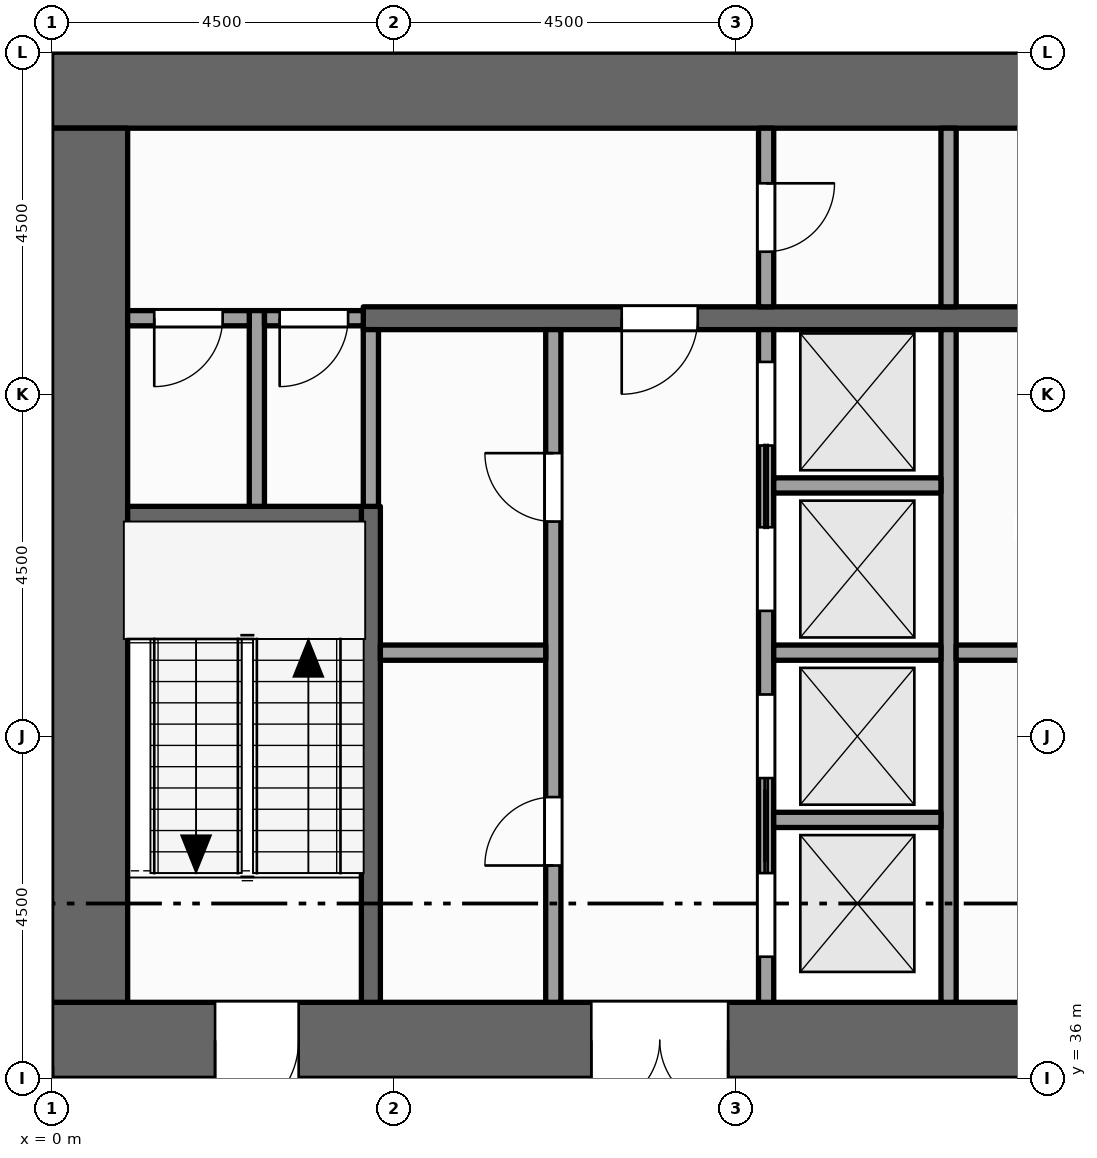
"""IFC4 building model, lengths in metres.
Left out: names, types, materials, properties, quantities, classifications, styles, units other than length and angle.
Written with IfcOpenShell. Run it as: python <this file> out.ifc"""

import sys

from ifc_helpers import new_model, si_unit, direction, frame, frame_2d, origin, place, context, subcontext, project, spatial, rectangle, extrude, element, fill, save


model = new_model("IFC4")
c1 = context("Model", 3, precision=1e-05, world=origin(), true_north=direction((0.0, 1.0)))
c2 = subcontext(c1, "Body", "Model", "MODEL_VIEW")
j1 = project(units=[si_unit("LENGTHUNIT", "METRE"), si_unit("PLANEANGLEUNIT", "RADIAN")], contexts=[c1])
p1 = place(None, origin())
s1 = spatial("IfcSite", under=j1, at=p1, CompositionType="ELEMENT")
p2 = place(p1, origin())
s2 = spatial("IfcBuilding", under=s1, at=p2, CompositionType="ELEMENT")
p3 = place(p2, frame((0.0, 0.0, 147.0)))
s3 = spatial("IfcBuildingStorey", under=s2, at=p3, CompositionType="ELEMENT", Elevation=147.0)
p4 = place(p3, frame((0.0, 36.5, -0.15), z_axis=(0.0, 0.0, 1.0), x_axis=(1.0, 0.0, 0.0)))
e1 = element("IfcWall", 1, at=p4, inside=s3, PredefinedType="SHEAR", context=c2, shape_type="SweptSolid", body=[
    extrude(rectangle(XDim=22.5, YDim=1.0, at=frame_2d((11.25, 0.0))), origin(), (0.0, 0.0, 1.0), 4.0),
])
p5 = place(p4, frame((7.1, 0.0, 0.15)))
e2 = element("IfcOpeningElement", 2, at=p5, cuts=e1, PredefinedType="OPENING", context=c2, shape_type="SweptSolid", body=[
    extrude(rectangle(XDim=1.8, YDim=2.1, at=frame_2d((0.9, 1.05))), frame((0.0, 0.51, 0.0), z_axis=(0.0, -1.0, 0.0), x_axis=(1.0, 0.0, 0.0)), (0.0, 0.0, 1.0), 1.02),
])
p6 = place(p4, frame((13.15, 0.0, 0.15)))
e3 = element("IfcOpeningElement", 3, at=p6, cuts=e1, PredefinedType="OPENING", context=c2, shape_type="SweptSolid", body=[
    extrude(rectangle(XDim=1.1, YDim=2.1, at=frame_2d((0.55, 1.05))), frame((0.0, 0.51, 0.0), z_axis=(0.0, -1.0, 0.0), x_axis=(1.0, 0.0, 0.0)), (0.0, 0.0, 1.0), 1.02),
])
p7 = place(p4, frame((2.15, 0.0, 0.15)))
e4 = element("IfcOpeningElement", 4, at=p7, cuts=e1, PredefinedType="OPENING", context=c2, shape_type="SweptSolid", body=[
    extrude(rectangle(XDim=1.1, YDim=2.1, at=frame_2d((0.55, 1.05))), frame((0.0, 0.51, 0.0), z_axis=(0.0, -1.0, 0.0), x_axis=(1.0, 0.0, 0.0)), (0.0, 0.0, 1.0), 1.02),
])
p8 = place(p4, frame((19.35, 0.0, 0.15)))
e5 = element("IfcOpeningElement", 5, at=p8, cuts=e1, PredefinedType="OPENING", context=c2, shape_type="SweptSolid", body=[
    extrude(rectangle(XDim=1.1, YDim=2.1, at=frame_2d((0.55, 1.05))), frame((0.0, 0.51, 0.0), z_axis=(0.0, -1.0, 0.0), x_axis=(1.0, 0.0, 0.0)), (0.0, 0.0, 1.0), 1.02),
])
p9 = place(p3, frame((0.0, 49.0, -0.15), z_axis=(0.0, 0.0, 1.0), x_axis=(1.0, 0.0, 0.0)))
e6 = element("IfcWall", 6, at=p9, inside=s3, PredefinedType="SHEAR", context=c2, shape_type="SweptSolid", body=[
    extrude(rectangle(XDim=22.5, YDim=1.0, at=frame_2d((11.25, 0.0))), origin(), (0.0, 0.0, 1.0), 4.0),
])
p10 = place(p3, frame((0.5, 37.0, -0.15), z_axis=(0.0, 0.0, 1.0), x_axis=(0.0, 1.0, 0.0)))
e7 = element("IfcWall", 7, at=p10, inside=s3, PredefinedType="SHEAR", context=c2, shape_type="SweptSolid", body=[
    extrude(rectangle(XDim=11.5, YDim=1.0, at=frame_2d((5.75, 0.0))), origin(), (0.0, 0.0, 1.0), 4.0),
])
p11 = place(p3, frame((0.0, 36.0, 0.0), z_axis=(0.0, 0.0, 1.0), x_axis=(-1.0, 0.0, 0.0)))
e8 = element("IfcWall", 8, at=p11, inside=s3, PredefinedType="STANDARD", context=c2, shape_type="SweptSolid", body=[
    extrude(rectangle(XDim=1.05, YDim=0.3, at=frame_2d((0.525, 0.0))), origin(), (0.0, 0.0, 1.0), 2.87),
])
p12 = place(p3, frame((2.7, 43.525, 0.0), z_axis=(0.0, 0.0, 1.0), x_axis=(0.0, 1.0, 0.0)))
e9 = element("IfcWall", 9, at=p12, inside=s3, PredefinedType="PARTITIONING", context=c2, shape_type="SweptSolid", body=[
    extrude(rectangle(XDim=2.575, YDim=0.2, at=frame_2d((1.288, 0.0))), origin(), (0.0, 0.0, 1.0), 3.85),
])
p13 = place(p3, frame((4.2, 37.0, 0.0), z_axis=(0.0, 0.0, 1.0), x_axis=(0.0, 1.0, 0.0)))
e10 = element("IfcWall", 10, at=p13, inside=s3, PredefinedType="SHEAR", context=c2, shape_type="SweptSolid", body=[
    extrude(rectangle(XDim=6.525, YDim=0.25, at=frame_2d((3.262, 0.0))), origin(), (0.0, 0.0, 1.0), 3.85),
])
p14 = place(p3, frame((4.2, 43.525, 0.0), z_axis=(0.0, 0.0, 1.0), x_axis=(0.0, 1.0, 0.0)))
e11 = element("IfcWall", 11, at=p14, inside=s3, PredefinedType="PARTITIONING", context=c2, shape_type="SweptSolid", body=[
    extrude(rectangle(XDim=2.325, YDim=0.2, at=frame_2d((1.163, 0.0))), origin(), (0.0, 0.0, 1.0), 3.85),
])
p15 = place(p3, frame((6.6, 37.0, 0.0), z_axis=(0.0, 0.0, 1.0), x_axis=(0.0, 1.0, 0.0)))
e12 = element("IfcWall", 12, at=p15, inside=s3, PredefinedType="PARTITIONING", context=c2, shape_type="SweptSolid", body=[
    extrude(rectangle(XDim=8.85, YDim=0.2, at=frame_2d((4.425, 0.0))), origin(), (0.0, 0.0, 1.0), 3.85),
])
p16 = place(p15, frame((1.8, 0.0, 0.0)))
e13 = element("IfcOpeningElement", 13, at=p16, cuts=e12, PredefinedType="OPENING", context=c2, shape_type="SweptSolid", body=[
    extrude(rectangle(XDim=0.9, YDim=2.1, at=frame_2d((0.45, 1.05))), frame((0.0, 0.11, 0.0), z_axis=(0.0, -1.0, 0.0), x_axis=(1.0, 0.0, 0.0)), (0.0, 0.0, 1.0), 0.22),
])
p17 = place(p15, frame((6.325, 0.0, 0.0)))
e14 = element("IfcOpeningElement", 14, at=p17, cuts=e12, PredefinedType="OPENING", context=c2, shape_type="SweptSolid", body=[
    extrude(rectangle(XDim=0.9, YDim=2.1, at=frame_2d((0.45, 1.05))), frame((0.0, 0.11, 0.0), z_axis=(0.0, -1.0, 0.0), x_axis=(1.0, 0.0, 0.0)), (0.0, 0.0, 1.0), 0.22),
])
p18 = place(p3, frame((9.4, 37.0, 0.0), z_axis=(0.0, 0.0, 1.0), x_axis=(0.0, 1.0, 0.0)))
e15 = element("IfcWall", 15, at=p18, inside=s3, PredefinedType="SOLIDWALL", context=c2, shape_type="SweptSolid", body=[
    extrude(rectangle(XDim=8.85, YDim=0.2, at=frame_2d((4.425, 0.0))), origin(), (0.0, 0.0, 1.0), 3.85),
])
p19 = place(p18, frame((0.6, 0.0, 0.012)))
e16 = element("IfcOpeningElement", 16, at=p19, cuts=e15, PredefinedType="OPENING", context=c2, shape_type="SweptSolid", body=[
    extrude(rectangle(XDim=1.1, YDim=2.1, at=frame_2d((0.55, 1.05))), frame((0.0, 0.11, 0.0), z_axis=(0.0, -1.0, 0.0), x_axis=(1.0, 0.0, 0.0)), (0.0, 0.0, 1.0), 0.22),
])
p20 = place(p18, frame((2.95, 0.0, 0.012)))
e17 = element("IfcOpeningElement", 17, at=p20, cuts=e15, PredefinedType="OPENING", context=c2, shape_type="SweptSolid", body=[
    extrude(rectangle(XDim=1.1, YDim=2.1, at=frame_2d((0.55, 1.05))), frame((0.0, 0.11, 0.0), z_axis=(0.0, -1.0, 0.0), x_axis=(1.0, 0.0, 0.0)), (0.0, 0.0, 1.0), 0.22),
])
p21 = place(p18, frame((5.15, 0.0, 0.012)))
e18 = element("IfcOpeningElement", 18, at=p21, cuts=e15, PredefinedType="OPENING", context=c2, shape_type="SweptSolid", body=[
    extrude(rectangle(XDim=1.1, YDim=2.1, at=frame_2d((0.55, 1.05))), frame((0.0, 0.11, 0.0), z_axis=(0.0, -1.0, 0.0), x_axis=(1.0, 0.0, 0.0)), (0.0, 0.0, 1.0), 0.22),
])
p22 = place(p18, frame((7.325, 0.0, 0.012)))
e19 = element("IfcOpeningElement", 19, at=p22, cuts=e15, PredefinedType="OPENING", context=c2, shape_type="SweptSolid", body=[
    extrude(rectangle(XDim=1.1, YDim=2.1, at=frame_2d((0.55, 1.05))), frame((0.0, 0.11, 0.0), z_axis=(0.0, -1.0, 0.0), x_axis=(1.0, 0.0, 0.0)), (0.0, 0.0, 1.0), 0.22),
])
p23 = place(p3, frame((9.4, 46.15, 0.0), z_axis=(0.0, 0.0, 1.0), x_axis=(0.0, 1.0, 0.0)))
e20 = element("IfcWall", 20, at=p23, inside=s3, PredefinedType="PARTITIONING", context=c2, shape_type="SweptSolid", body=[
    extrude(rectangle(XDim=2.35, YDim=0.2, at=frame_2d((1.175, 0.0))), origin(), (0.0, 0.0, 1.0), 3.85),
])
p24 = place(p23, frame((0.725, 0.0, 0.0)))
e21 = element("IfcOpeningElement", 21, at=p24, cuts=e20, PredefinedType="OPENING", context=c2, shape_type="SweptSolid", body=[
    extrude(rectangle(XDim=0.9, YDim=2.1, at=frame_2d((0.45, 1.05))), frame((0.0, 0.11, 0.0), z_axis=(0.0, -1.0, 0.0), x_axis=(1.0, 0.0, 0.0)), (0.0, 0.0, 1.0), 0.22),
])
p25 = place(p3, frame((11.8, 37.0, 0.0), z_axis=(0.0, 0.0, 1.0), x_axis=(0.0, 1.0, 0.0)))
e22 = element("IfcWall", 22, at=p25, inside=s3, PredefinedType="SOLIDWALL", context=c2, shape_type="SweptSolid", body=[
    extrude(rectangle(XDim=8.85, YDim=0.2, at=frame_2d((4.425, 0.0))), origin(), (0.0, 0.0, 1.0), 3.85),
])
p26 = place(p3, frame((11.8, 46.15, 0.0), z_axis=(0.0, 0.0, 1.0), x_axis=(0.0, 1.0, 0.0)))
e23 = element("IfcWall", 23, at=p26, inside=s3, PredefinedType="PARTITIONING", context=c2, shape_type="SweptSolid", body=[
    extrude(rectangle(XDim=2.35, YDim=0.2, at=frame_2d((1.175, 0.0))), origin(), (0.0, 0.0, 1.0), 3.85),
])
p27 = place(p3, frame((9.5, 39.4, 0.0), z_axis=(0.0, 0.0, 1.0), x_axis=(1.0, 0.0, 0.0)))
e24 = element("IfcWall", 24, at=p27, inside=s3, PredefinedType="SOLIDWALL", context=c2, shape_type="SweptSolid", body=[
    extrude(rectangle(XDim=2.2, YDim=0.2, at=frame_2d((1.1, 0.0))), origin(), (0.0, 0.0, 1.0), 3.85),
])
p28 = place(p3, frame((4.325, 41.6, 0.0), z_axis=(0.0, 0.0, 1.0), x_axis=(1.0, 0.0, 0.0)))
e25 = element("IfcWall", 25, at=p28, inside=s3, PredefinedType="PARTITIONING", context=c2, shape_type="SweptSolid", body=[
    extrude(rectangle(XDim=2.175, YDim=0.2, at=frame_2d((1.087, 0.0))), origin(), (0.0, 0.0, 1.0), 3.85),
])
p29 = place(p3, frame((9.5, 41.6, 0.0), z_axis=(0.0, 0.0, 1.0), x_axis=(1.0, 0.0, 0.0)))
e26 = element("IfcWall", 26, at=p29, inside=s3, PredefinedType="SOLIDWALL", context=c2, shape_type="SweptSolid", body=[
    extrude(rectangle(XDim=2.2, YDim=0.2, at=frame_2d((1.1, 0.0))), origin(), (0.0, 0.0, 1.0), 3.85),
])
p30 = place(p3, frame((11.9, 41.6, 0.0), z_axis=(0.0, 0.0, 1.0), x_axis=(1.0, 0.0, 0.0)))
e27 = element("IfcWall", 27, at=p30, inside=s3, PredefinedType="PARTITIONING", context=c2, shape_type="SweptSolid", body=[
    extrude(rectangle(XDim=3.6, YDim=0.2, at=frame_2d((1.8, 0.0))), origin(), (0.0, 0.0, 1.0), 3.85),
])
p31 = place(p30, frame((1.3, 0.0, 0.0)))
e28 = element("IfcOpeningElement", 28, at=p31, cuts=e27, PredefinedType="OPENING", context=c2, shape_type="SweptSolid", body=[
    extrude(rectangle(XDim=1.0, YDim=2.1, at=frame_2d((0.5, 1.05))), frame((0.0, 0.11, 0.0), z_axis=(0.0, -1.0, 0.0), x_axis=(1.0, 0.0, 0.0)), (0.0, 0.0, 1.0), 0.22),
])
p32 = place(p3, frame((1.0, 43.4, 0.0), z_axis=(0.0, 0.0, 1.0), x_axis=(1.0, 0.0, 0.0)))
e29 = element("IfcWall", 29, at=p32, inside=s3, PredefinedType="SHEAR", context=c2, shape_type="SweptSolid", body=[
    extrude(rectangle(XDim=3.075, YDim=0.25, at=frame_2d((1.538, 0.0))), origin(), (0.0, 0.0, 1.0), 3.85),
])
p33 = place(p3, frame((9.5, 43.8, 0.0), z_axis=(0.0, 0.0, 1.0), x_axis=(1.0, 0.0, 0.0)))
e30 = element("IfcWall", 30, at=p33, inside=s3, PredefinedType="SOLIDWALL", context=c2, shape_type="SweptSolid", body=[
    extrude(rectangle(XDim=2.2, YDim=0.2, at=frame_2d((1.1, 0.0))), origin(), (0.0, 0.0, 1.0), 3.85),
])
p34 = place(p3, frame((1.0, 46.0, 0.0), z_axis=(0.0, 0.0, 1.0), x_axis=(1.0, 0.0, 0.0)))
e31 = element("IfcWall", 31, at=p34, inside=s3, PredefinedType="PARTITIONING", context=c2, shape_type="SweptSolid", body=[
    extrude(rectangle(XDim=1.6, YDim=0.2, at=frame_2d((0.8, 0.0))), origin(), (0.0, 0.0, 1.0), 3.85),
])
p35 = place(p34, frame((0.35, 0.0, 0.0)))
e32 = element("IfcOpeningElement", 32, at=p35, cuts=e31, PredefinedType="OPENING", context=c2, shape_type="SweptSolid", body=[
    extrude(rectangle(XDim=0.9, YDim=2.1, at=frame_2d((0.45, 1.05))), frame((0.0, 0.11, 0.0), z_axis=(0.0, -1.0, 0.0), x_axis=(1.0, 0.0, 0.0)), (0.0, 0.0, 1.0), 0.22),
])
p36 = place(p3, frame((2.8, 46.0, 0.0), z_axis=(0.0, 0.0, 1.0), x_axis=(1.0, 0.0, 0.0)))
e33 = element("IfcWall", 33, at=p36, inside=s3, PredefinedType="PARTITIONING", context=c2, shape_type="SweptSolid", body=[
    extrude(rectangle(XDim=1.3, YDim=0.2, at=frame_2d((0.65, 0.0))), origin(), (0.0, 0.0, 1.0), 3.85),
])
p37 = place(p36, frame((0.2, 0.0, 0.0)))
e34 = element("IfcOpeningElement", 34, at=p37, cuts=e33, PredefinedType="OPENING", context=c2, shape_type="SweptSolid", body=[
    extrude(rectangle(XDim=0.9, YDim=2.1, at=frame_2d((0.45, 1.05))), frame((0.0, 0.11, 0.0), z_axis=(0.0, -1.0, 0.0), x_axis=(1.0, 0.0, 0.0)), (0.0, 0.0, 1.0), 0.22),
])
p38 = place(p3, frame((4.1, 46.0, 0.0), z_axis=(0.0, 0.0, 1.0), x_axis=(1.0, 0.0, 0.0)))
e35 = element("IfcWall", 35, at=p38, inside=s3, PredefinedType="SHEAR", context=c2, shape_type="SweptSolid", body=[
    extrude(rectangle(XDim=14.5, YDim=0.3, at=frame_2d((7.25, 0.0))), origin(), (0.0, 0.0, 1.0), 3.85),
])
p39 = place(p38, frame((3.4, 0.0, 0.0)))
e36 = element("IfcOpeningElement", 36, at=p39, cuts=e35, PredefinedType="OPENING", context=c2, shape_type="SweptSolid", body=[
    extrude(rectangle(XDim=1.0, YDim=2.1, at=frame_2d((0.5, 1.05))), frame((0.0, 0.16, 0.0), z_axis=(0.0, -1.0, 0.0), x_axis=(1.0, 0.0, 0.0)), (0.0, 0.0, 1.0), 0.32),
])
p40 = place(p38, frame((9.1, 0.0, 0.0)))
e37 = element("IfcOpeningElement", 37, at=p40, cuts=e35, PredefinedType="OPENING", context=c2, shape_type="SweptSolid", body=[
    extrude(rectangle(XDim=1.0, YDim=2.1, at=frame_2d((0.5, 1.05))), frame((0.0, 0.16, 0.0), z_axis=(0.0, -1.0, 0.0), x_axis=(1.0, 0.0, 0.0)), (0.0, 0.0, 1.0), 0.32),
])
p41 = place(p19, origin())
e38 = element("IfcDoor", 38, at=p41, inside=s3, OperationType="SLIDING_TO_RIGHT", PredefinedType="DOOR", context=c2, shape_type="SweptSolid", body=[
    extrude(rectangle(XDim=1.1, YDim=2.1, at=frame_2d((0.55, 1.05))), frame((0.0, 0.025, 0.0), z_axis=(0.0, -1.0, 0.0), x_axis=(1.0, 0.0, 0.0)), (0.0, 0.0, 1.0), 0.05),
])
fill(e16, e38)
p42 = place(p20, origin())
e39 = element("IfcDoor", 39, at=p42, inside=s3, OperationType="SLIDING_TO_LEFT", PredefinedType="DOOR", context=c2, shape_type="SweptSolid", body=[
    extrude(rectangle(XDim=1.1, YDim=2.1, at=frame_2d((0.55, 1.05))), frame((0.0, 0.025, 0.0), z_axis=(0.0, -1.0, 0.0), x_axis=(1.0, 0.0, 0.0)), (0.0, 0.0, 1.0), 0.05),
])
fill(e17, e39)
p43 = place(p21, origin())
e40 = element("IfcDoor", 40, at=p43, inside=s3, OperationType="SLIDING_TO_RIGHT", PredefinedType="DOOR", context=c2, shape_type="SweptSolid", body=[
    extrude(rectangle(XDim=1.1, YDim=2.1, at=frame_2d((0.55, 1.05))), frame((0.0, 0.025, 0.0), z_axis=(0.0, -1.0, 0.0), x_axis=(1.0, 0.0, 0.0)), (0.0, 0.0, 1.0), 0.05),
])
fill(e18, e40)
p44 = place(p22, origin())
e41 = element("IfcDoor", 41, at=p44, inside=s3, OperationType="SLIDING_TO_LEFT", PredefinedType="DOOR", context=c2, shape_type="SweptSolid", body=[
    extrude(rectangle(XDim=1.1, YDim=2.1, at=frame_2d((0.55, 1.05))), frame((0.0, 0.025, 0.0), z_axis=(0.0, -1.0, 0.0), x_axis=(1.0, 0.0, 0.0)), (0.0, 0.0, 1.0), 0.05),
])
fill(e19, e41)
p45 = place(p5, origin())
e42 = element("IfcDoor", 42, at=p45, inside=s3, OperationType="DOUBLE_DOOR_SINGLE_SWING", PredefinedType="DOOR", context=c2, shape_type="SweptSolid", body=[
    extrude(rectangle(XDim=1.8, YDim=2.1, at=frame_2d((0.9, 1.05))), frame((0.0, 0.025, 0.0), z_axis=(0.0, -1.0, 0.0), x_axis=(1.0, 0.0, 0.0)), (0.0, 0.0, 1.0), 0.05),
])
fill(e2, e42)
p46 = place(p39, origin())
e43 = element("IfcDoor", 43, at=p46, inside=s3, OperationType="SINGLE_SWING_LEFT", PredefinedType="DOOR", context=c2, shape_type="SweptSolid", body=[
    extrude(rectangle(XDim=1.0, YDim=2.1, at=frame_2d((0.5, 1.05))), frame((0.0, 0.025, 0.0), z_axis=(0.0, -1.0, 0.0), x_axis=(1.0, 0.0, 0.0)), (0.0, 0.0, 1.0), 0.05),
])
fill(e36, e43)
p47 = place(p24, origin())
e44 = element("IfcDoor", 44, at=p47, inside=s3, OperationType="SINGLE_SWING_RIGHT", PredefinedType="DOOR", context=c2, shape_type="SweptSolid", body=[
    extrude(rectangle(XDim=0.9, YDim=2.1, at=frame_2d((0.45, 1.05))), frame((0.0, 0.025, 0.0), z_axis=(0.0, -1.0, 0.0), x_axis=(1.0, 0.0, 0.0)), (0.0, 0.0, 1.0), 0.05),
])
fill(e21, e44)
p48 = place(p7, origin())
e45 = element("IfcDoor", 45, at=p48, inside=s3, OperationType="SINGLE_SWING_LEFT", PredefinedType="DOOR", context=c2, shape_type="SweptSolid", body=[
    extrude(rectangle(XDim=1.1, YDim=2.1, at=frame_2d((0.55, 1.05))), frame((0.0, 0.025, 0.0), z_axis=(0.0, -1.0, 0.0), x_axis=(1.0, 0.0, 0.0)), (0.0, 0.0, 1.0), 0.05),
])
fill(e4, e45)
p49 = place(p35, origin())
e46 = element("IfcDoor", 46, at=p49, inside=s3, OperationType="SINGLE_SWING_LEFT", PredefinedType="DOOR", context=c2, shape_type="SweptSolid", body=[
    extrude(rectangle(XDim=0.9, YDim=2.1, at=frame_2d((0.45, 1.05))), frame((0.0, 0.025, 0.0), z_axis=(0.0, -1.0, 0.0), x_axis=(1.0, 0.0, 0.0)), (0.0, 0.0, 1.0), 0.05),
])
fill(e32, e46)
p50 = place(p37, origin())
e47 = element("IfcDoor", 47, at=p50, inside=s3, OperationType="SINGLE_SWING_LEFT", PredefinedType="DOOR", context=c2, shape_type="SweptSolid", body=[
    extrude(rectangle(XDim=0.9, YDim=2.1, at=frame_2d((0.45, 1.05))), frame((0.0, 0.025, 0.0), z_axis=(0.0, -1.0, 0.0), x_axis=(1.0, 0.0, 0.0)), (0.0, 0.0, 1.0), 0.05),
])
fill(e34, e47)
p51 = place(p16, origin())
e48 = element("IfcDoor", 48, at=p51, inside=s3, OperationType="SINGLE_SWING_LEFT", PredefinedType="DOOR", context=c2, shape_type="SweptSolid", body=[
    extrude(rectangle(XDim=0.9, YDim=2.1, at=frame_2d((0.45, 1.05))), frame((0.0, 0.025, 0.0), z_axis=(0.0, -1.0, 0.0), x_axis=(1.0, 0.0, 0.0)), (0.0, 0.0, 1.0), 0.05),
])
fill(e13, e48)
p52 = place(p17, origin())
e49 = element("IfcDoor", 49, at=p52, inside=s3, OperationType="SINGLE_SWING_RIGHT", PredefinedType="DOOR", context=c2, shape_type="SweptSolid", body=[
    extrude(rectangle(XDim=0.9, YDim=2.1, at=frame_2d((0.45, 1.05))), frame((0.0, 0.025, 0.0), z_axis=(0.0, -1.0, 0.0), x_axis=(1.0, 0.0, 0.0)), (0.0, 0.0, 1.0), 0.05),
])
fill(e14, e49)
save(model, sys.argv[1])
